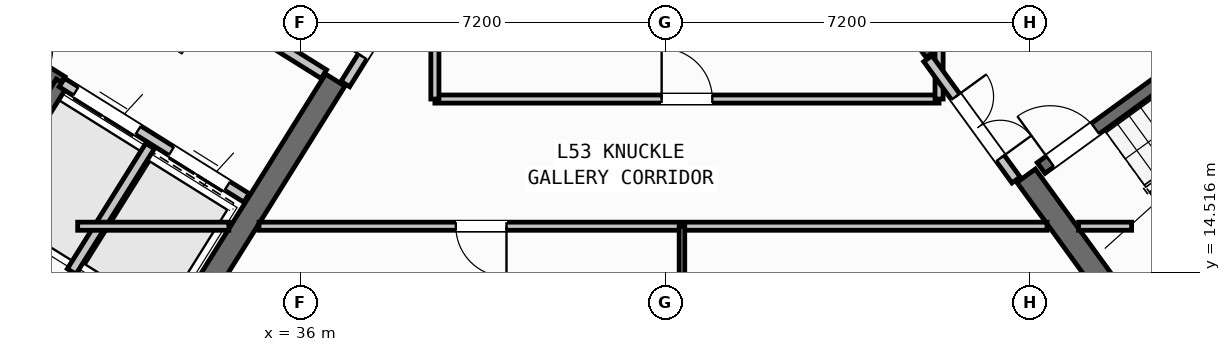
"""IFC4 building model, lengths in metres.
Left out: names, types, materials, properties, quantities, classifications, styles, units other than length and angle.
Written with IfcOpenShell. Run it as: python <this file> out.ifc"""

import sys

from ifc_helpers import new_model, si_unit, direction, frame, frame_2d, origin, place, context, subcontext, project, spatial, rectangle, extrude, source, transform, mapped, element, fill, save


model = new_model("IFC4")
c1 = context("Model", 3, precision=1e-05, world=origin(), true_north=direction((0.0, 1.0)))
c2 = subcontext(c1, "Body", "Model", "MODEL_VIEW")
j1 = project(units=[si_unit("LENGTHUNIT", "METRE"), si_unit("PLANEANGLEUNIT", "RADIAN")], contexts=[c1])
p1 = place(None, origin())
s1 = spatial("IfcSite", under=j1, at=p1, CompositionType="ELEMENT")
p2 = place(p1, origin())
s2 = spatial("IfcBuilding", under=s1, at=p2, CompositionType="ELEMENT")
p3 = place(p2, frame((0.0, 0.0, 211.2)))
s3 = spatial("IfcBuildingStorey", under=s2, at=p3, CompositionType="ELEMENT", Elevation=211.2)
p4 = place(p3, frame((33.324, 12.503, 0.0), z_axis=(0.0, 0.0, 1.0), x_axis=(-0.848043529849, 0.529926571782, 0.0)))
e1 = element("IfcWall", 1, at=p4, inside=s3, PredefinedType="SHEAR", context=c2, shape_type="SweptSolid", body=[
    extrude(rectangle(XDim=13.04, YDim=0.45, at=frame_2d((6.52, 0.0))), origin(), (0.0, 0.0, 1.0), 3.35),
])
p5 = place(p3, frame((36.683, 18.304, 0.0), z_axis=(0.0, 0.0, 1.0), x_axis=(-0.529904039071, -0.848057609704, 0.0)))
e2 = element("IfcWall", 2, at=p5, inside=s3, PredefinedType="SHEAR", context=c2, shape_type="SweptSolid", body=[
    extrude(rectangle(XDim=6.475, YDim=0.45, at=frame_2d((3.238, 0.0))), origin(), (0.0, 0.0, 1.0), 3.35),
])
p6 = place(p3, frame((52.399, 13.169, 0.0), z_axis=(0.0, 0.0, 1.0), x_axis=(0.809022352778, 0.587777877013, 0.0)))
e3 = element("IfcWall", 3, at=p6, inside=s3, PredefinedType="SHEAR", context=c2, shape_type="SweptSolid", body=[
    extrude(rectangle(XDim=12.24, YDim=0.45, at=frame_2d((6.12, 0.0))), origin(), (0.0, 0.0, 1.0), 3.35),
])
p7 = place(p3, frame((52.449, 13.483, 0.0), z_axis=(0.0, 0.0, 1.0), x_axis=(-0.587819244441, 0.808992296542, 0.0)))
e4 = element("IfcWall", 4, at=p7, inside=s3, PredefinedType="SHEAR", context=c2, shape_type="SweptSolid", body=[
    extrude(rectangle(XDim=3.625, YDim=0.45, at=frame_2d((1.812, 0.0))), origin(), (0.0, 0.0, 1.0), 3.35),
])
p8 = place(p3, frame((48.526, 18.884, 0.0), z_axis=(0.0, 0.0, 1.0), x_axis=(-0.587774812919, 0.809024578921, 0.0)))
e5 = element("IfcWall", 5, at=p8, inside=s3, PredefinedType="SHEAR", context=c2, shape_type="SweptSolid", body=[
    extrude(rectangle(XDim=6.475, YDim=0.45, at=frame_2d((3.238, 0.0))), origin(), (0.0, 0.0, 1.0), 3.35),
])
p9 = place(p3, frame((31.76, 12.183, 0.0), z_axis=(0.0, 0.0, 1.0), x_axis=(-0.848047074256, 0.529920899612, 0.0)))
e6 = element("IfcWall", 6, at=p9, inside=s3, PredefinedType="STANDARD", context=c2, shape_type="SweptSolid", body=[
    extrude(rectangle(XDim=30.652, YDim=0.32, at=frame_2d((15.326, 0.0))), origin(), (0.0, 0.0, 1.0), 3.35),
])
p10 = place(p9, frame((15.166, 0.0, 0.0)))
e7 = element("IfcOpeningElement", 7, at=p10, cuts=e6, PredefinedType="OPENING", context=c2, shape_type="SweptSolid", body=[
    extrude(rectangle(XDim=1.2, YDim=2.15, at=frame_2d((0.6, 1.075))), frame((0.0, 0.17, 0.0), z_axis=(0.0, -1.0, 0.0), x_axis=(1.0, 0.0, 0.0)), (0.0, 0.0, 1.0), 0.34),
])
p11 = place(p9, frame((2.24, 0.0, 0.9)))
e8 = element("IfcOpeningElement", 8, at=p11, cuts=e6, PredefinedType="OPENING", context=c2, shape_type="SweptSolid", body=[
    extrude(rectangle(XDim=1.65, YDim=1.45, at=frame_2d((0.825, 0.725))), frame((0.0, 0.17, 0.0), z_axis=(0.0, -1.0, 0.0), x_axis=(1.0, 0.0, 0.0)), (0.0, 0.0, 1.0), 0.34),
])
p12 = place(p9, frame((7.469, 0.0, 0.9)))
e9 = element("IfcOpeningElement", 9, at=p12, cuts=e6, PredefinedType="OPENING", context=c2, shape_type="SweptSolid", body=[
    extrude(rectangle(XDim=1.65, YDim=1.45, at=frame_2d((0.825, 0.725))), frame((0.0, 0.17, 0.0), z_axis=(0.0, -1.0, 0.0), x_axis=(1.0, 0.0, 0.0)), (0.0, 0.0, 1.0), 0.34),
])
p13 = place(p9, frame((12.623, 0.0, 1.0)))
e10 = element("IfcOpeningElement", 10, at=p13, cuts=e6, PredefinedType="OPENING", context=c2, shape_type="SweptSolid", body=[
    extrude(rectangle(XDim=0.9, YDim=1.25, at=frame_2d((0.45, 0.625))), frame((0.0, 0.17, 0.0), z_axis=(0.0, -1.0, 0.0), x_axis=(1.0, 0.0, 0.0)), (0.0, 0.0, 1.0), 0.34),
])
p14 = place(p9, frame((19.715, 0.0, 1.0)))
e11 = element("IfcOpeningElement", 11, at=p14, cuts=e6, PredefinedType="OPENING", context=c2, shape_type="SweptSolid", body=[
    extrude(rectangle(XDim=0.9, YDim=1.25, at=frame_2d((0.45, 0.625))), frame((0.0, 0.17, 0.0), z_axis=(0.0, -1.0, 0.0), x_axis=(1.0, 0.0, 0.0)), (0.0, 0.0, 1.0), 0.34),
])
p15 = place(p9, frame((25.566, 0.0, 0.9)))
e12 = element("IfcOpeningElement", 12, at=p15, cuts=e6, PredefinedType="OPENING", context=c2, shape_type="SweptSolid", body=[
    extrude(rectangle(XDim=1.65, YDim=1.45, at=frame_2d((0.825, 0.725))), frame((0.0, 0.17, 0.0), z_axis=(0.0, -1.0, 0.0), x_axis=(1.0, 0.0, 0.0)), (0.0, 0.0, 1.0), 0.34),
])
p16 = place(p9, frame((28.896, 0.0, 1.0)))
e13 = element("IfcOpeningElement", 13, at=p16, cuts=e6, PredefinedType="OPENING", context=c2, shape_type="SweptSolid", body=[
    extrude(rectangle(XDim=0.9, YDim=1.25, at=frame_2d((0.45, 0.625))), frame((0.0, 0.17, 0.0), z_axis=(0.0, -1.0, 0.0), x_axis=(1.0, 0.0, 0.0)), (0.0, 0.0, 1.0), 0.34),
])
p17 = place(p3, frame((31.28, 18.261, 0.0), z_axis=(0.0, 0.0, 1.0), x_axis=(-0.848051618787, 0.529913626805, 0.0)))
e14 = element("IfcWall", 14, at=p17, inside=s3, PredefinedType="SHEAR", context=c2, shape_type="SweptSolid", body=[
    extrude(rectangle(XDim=7.46, YDim=0.26, at=frame_2d((3.73, 0.0))), origin(), (0.0, 0.0, 1.0), 3.35),
])
p18 = place(p17, frame((0.36, 0.0, 0.0)))
e15 = element("IfcOpeningElement", 15, at=p18, cuts=e14, PredefinedType="OPENING", context=c2, shape_type="SweptSolid", body=[
    extrude(rectangle(XDim=0.86, YDim=2.05, at=frame_2d((0.43, 1.025))), frame((0.0, 0.14, 0.0), z_axis=(0.0, -1.0, 0.0), x_axis=(1.0, 0.0, 0.0)), (0.0, 0.0, 1.0), 0.28),
])
p19 = place(p3, frame((31.288, 18.256, 0.0), z_axis=(0.0, 0.0, 1.0), x_axis=(-0.529943379326, -0.848033026897, 0.0)))
e16 = element("IfcWall", 16, at=p19, inside=s3, PredefinedType="SHEAR", context=c2, shape_type="SweptSolid", body=[
    extrude(rectangle(XDim=3.16, YDim=0.26, at=frame_2d((1.58, 0.0))), origin(), (0.0, 0.0, 1.0), 3.35),
])
p20 = place(p3, frame((34.933, 15.978, 0.0), z_axis=(0.0, 0.0, 1.0), x_axis=(-0.848055739377, 0.529907032327, 0.0)))
e17 = element("IfcWall", 17, at=p20, inside=s3, PredefinedType="STANDARD", context=c2, shape_type="SweptSolid", body=[
    extrude(rectangle(XDim=4.298, YDim=0.2, at=frame_2d((2.149, 0.0))), origin(), (0.0, 0.0, 1.0), 3.34),
])
p21 = place(p20, frame((0.448, 0.0, 0.0)))
e18 = element("IfcOpeningElement", 18, at=p21, cuts=e17, PredefinedType="OPENING", context=c2, shape_type="SweptSolid", body=[
    extrude(rectangle(XDim=1.3, YDim=2.2, at=frame_2d((0.65, 1.1))), frame((0.0, 0.11, 0.0), z_axis=(0.0, -1.0, 0.0), x_axis=(1.0, 0.0, 0.0)), (0.0, 0.0, 1.0), 0.22),
])
p22 = place(p20, frame((2.523, 0.0, 0.0)))
e19 = element("IfcOpeningElement", 19, at=p22, cuts=e17, PredefinedType="OPENING", context=c2, shape_type="SweptSolid", body=[
    extrude(rectangle(XDim=1.45, YDim=2.25, at=frame_2d((0.725, 1.125))), frame((0.0, 0.11, 0.0), z_axis=(0.0, -1.0, 0.0), x_axis=(1.0, 0.0, 0.0)), (0.0, 0.0, 1.0), 0.22),
])
p23 = place(p3, frame((36.459, 18.421, 0.0), z_axis=(0.0, 0.0, 1.0), x_axis=(-0.848059591691, 0.529900867089, 0.0)))
e20 = element("IfcWall", 20, at=p23, inside=s3, PredefinedType="STANDARD", context=c2, shape_type="SweptSolid", body=[
    extrude(rectangle(XDim=5.818, YDim=0.2, at=frame_2d((2.909, 0.0))), origin(), (0.0, 0.0, 1.0), 3.34),
])
p24 = place(p23, frame((2.598, 0.0, 0.0)))
e21 = element("IfcOpeningElement", 21, at=p24, cuts=e20, PredefinedType="OPENING", context=c2, shape_type="SweptSolid", body=[
    extrude(rectangle(XDim=1.15, YDim=2.1, at=frame_2d((0.575, 1.05))), frame((0.0, 0.11, 0.0), z_axis=(0.0, -1.0, 0.0), x_axis=(1.0, 0.0, 0.0)), (0.0, 0.0, 1.0), 0.22),
])
p25 = place(p3, frame((33.029, 17.003, 0.0), z_axis=(0.0, 0.0, 1.0), x_axis=(-0.529916267533, -0.848049968695, 0.0)))
e22 = element("IfcWall", 22, at=p25, inside=s3, PredefinedType="STANDARD", context=c2, shape_type="SweptSolid", body=[
    extrude(rectangle(XDim=2.92, YDim=0.2, at=frame_2d((1.46, 0.0))), origin(), (0.0, 0.0, 1.0), 3.34),
])
p26 = place(p3, frame((52.472, 14.013, 0.0), z_axis=(0.0, 0.0, 1.0), x_axis=(0.809028366311, 0.587769599847, 0.0)))
e23 = element("IfcWall", 23, at=p26, inside=s3, PredefinedType="SHEAR", context=c2, shape_type="SweptSolid", body=[
    extrude(rectangle(XDim=7.33, YDim=0.26, at=frame_2d((3.665, 0.0))), origin(), (0.0, 0.0, 1.0), 3.35),
])
p27 = place(p3, frame((50.615, 16.57, 0.0), z_axis=(0.0, 0.0, 1.0), x_axis=(0.809028366311, 0.587769599847, 0.0)))
e24 = element("IfcWall", 24, at=p27, inside=s3, PredefinedType="SHEAR", context=c2, shape_type="SweptSolid", body=[
    extrude(rectangle(XDim=7.33, YDim=0.26, at=frame_2d((3.665, 0.0))), origin(), (0.0, 0.0, 1.0), 3.35),
])
p28 = place(p27, frame((0.22, 0.0, 0.0)))
e25 = element("IfcOpeningElement", 25, at=p28, cuts=e24, PredefinedType="OPENING", context=c2, shape_type="SweptSolid", body=[
    extrude(rectangle(XDim=1.1, YDim=2.1, at=frame_2d((0.55, 1.05))), frame((0.0, 0.14, 0.0), z_axis=(0.0, -1.0, 0.0), x_axis=(1.0, 0.0, 0.0)), (0.0, 0.0, 1.0), 0.28),
])
p29 = place(p3, frame((38.451, 20.737, 0.0), z_axis=(0.0, 0.0, 1.0), x_axis=(-0.529924799939, -0.848044637038, 0.0)))
e26 = element("IfcWall", 26, at=p29, inside=s3, PredefinedType="STANDARD", context=c2, shape_type="SweptSolid", body=[
    extrude(rectangle(XDim=2.96, YDim=0.2, at=frame_2d((1.48, 0.0))), origin(), (0.0, 0.0, 1.0), 3.34),
])
p30 = place(p29, frame((1.46, 0.0, 0.0)))
e27 = element("IfcOpeningElement", 27, at=p30, cuts=e26, PredefinedType="OPENING", context=c2, shape_type="SweptSolid", body=[
    extrude(rectangle(XDim=0.86, YDim=2.05, at=frame_2d((0.43, 1.025))), frame((0.0, 0.11, 0.0), z_axis=(0.0, -1.0, 0.0), x_axis=(1.0, 0.0, 0.0)), (0.0, 0.0, 1.0), 0.22),
])
p31 = place(p3, frame((31.6, 15.42, 0.0), z_axis=(0.0, 0.0, 1.0), x_axis=(1.0, 0.0, 0.0)))
e28 = element("IfcWall", 28, at=p31, inside=s3, PredefinedType="PARTITIONING", context=c2, shape_type="SweptSolid", body=[
    extrude(rectangle(XDim=2.984, YDim=0.16, at=frame_2d((1.492, 0.0))), origin(), (0.0, 0.0, 1.0), 3.34),
])
p32 = place(p3, frame((35.178, 15.42, 0.0), z_axis=(0.0, 0.0, 1.0), x_axis=(1.0, 0.0, 0.0)))
e29 = element("IfcWall", 29, at=p32, inside=s3, PredefinedType="PARTITIONING", context=c2, shape_type="SweptSolid", body=[
    extrude(rectangle(XDim=15.552, YDim=0.16, at=frame_2d((7.776, 0.0))), origin(), (0.0, 0.0, 1.0), 3.34),
])
p33 = place(p32, frame((3.885, 0.0, 0.0)))
e30 = element("IfcOpeningElement", 30, at=p33, cuts=e29, PredefinedType="OPENING", context=c2, shape_type="SweptSolid", body=[
    extrude(rectangle(XDim=1.0, YDim=2.1, at=frame_2d((0.5, 1.05))), frame((0.0, 0.09, 0.0), z_axis=(0.0, -1.0, 0.0), x_axis=(1.0, 0.0, 0.0)), (0.0, 0.0, 1.0), 0.18),
])
p34 = place(p3, frame((51.354, 15.42, 0.0), z_axis=(0.0, 0.0, 1.0), x_axis=(1.0, 0.0, 0.0)))
e31 = element("IfcWall", 31, at=p34, inside=s3, PredefinedType="PARTITIONING", context=c2, shape_type="SweptSolid", body=[
    extrude(rectangle(XDim=1.046, YDim=0.16, at=frame_2d((0.523, 0.0))), origin(), (0.0, 0.0, 1.0), 3.34),
])
p35 = place(p3, frame((38.65, 17.93, 0.0), z_axis=(0.0, 0.0, 1.0), x_axis=(1.0, 0.0, 0.0)))
e32 = element("IfcWall", 32, at=p35, inside=s3, PredefinedType="PARTITIONING", context=c2, shape_type="SweptSolid", body=[
    extrude(rectangle(XDim=9.95, YDim=0.16, at=frame_2d((4.975, 0.0))), origin(), (0.0, 0.0, 1.0), 3.34),
])
p36 = place(p35, frame((4.475, 0.0, 0.0)))
e33 = element("IfcOpeningElement", 33, at=p36, cuts=e32, PredefinedType="OPENING", context=c2, shape_type="SweptSolid", body=[
    extrude(rectangle(XDim=1.0, YDim=2.1, at=frame_2d((0.5, 1.05))), frame((0.0, 0.09, 0.0), z_axis=(0.0, -1.0, 0.0), x_axis=(1.0, 0.0, 0.0)), (0.0, 0.0, 1.0), 0.18),
])
p37 = place(p3, frame((38.65, 17.93, 0.0), z_axis=(0.0, 0.0, 1.0), x_axis=(0.0, 1.0, 0.0)))
e34 = element("IfcWall", 34, at=p37, inside=s3, PredefinedType="PARTITIONING", context=c2, shape_type="SweptSolid", body=[
    extrude(rectangle(XDim=3.046, YDim=0.16, at=frame_2d((1.523, 0.0))), origin(), (0.0, 0.0, 1.0), 3.34),
])
p38 = place(p3, frame((48.6, 17.93, 0.0), z_axis=(0.0, 0.0, 1.0), x_axis=(0.0, 1.0, 0.0)))
e35 = element("IfcWall", 35, at=p38, inside=s3, PredefinedType="PARTITIONING", context=c2, shape_type="SweptSolid", body=[
    extrude(rectangle(XDim=0.993, YDim=0.16, at=frame_2d((0.496, 0.0))), origin(), (0.0, 0.0, 1.0), 3.34),
])
p39 = place(p3, frame((50.119, 16.333, 0.0), z_axis=(0.0, 0.0, 1.0), x_axis=(-0.587749856981, 0.809042709391, 0.0)))
e36 = element("IfcWall", 36, at=p39, inside=s3, PredefinedType="STANDARD", context=c2, shape_type="SweptSolid", body=[
    extrude(rectangle(XDim=2.96, YDim=0.2, at=frame_2d((1.48, 0.0))), origin(), (0.0, 0.0, 1.0), 3.34),
])
p40 = place(p39, frame((0.53, 0.0, 0.0)))
e37 = element("IfcOpeningElement", 37, at=p40, cuts=e36, PredefinedType="OPENING", context=c2, shape_type="SweptSolid", body=[
    extrude(rectangle(XDim=1.5, YDim=2.15, at=frame_2d((0.75, 1.075))), frame((0.0, 0.11, 0.0), z_axis=(0.0, -1.0, 0.0), x_axis=(1.0, 0.0, 0.0)), (0.0, 0.0, 1.0), 0.22),
])
p41 = place(p3, frame((43.526, 1.96, 0.0), z_axis=(0.0, 0.0, 1.0), x_axis=(0.0, 1.0, 0.0)))
e38 = element("IfcWall", 38, at=p41, inside=s3, PredefinedType="PARTITIONING", context=c2, shape_type="SweptSolid", body=[
    extrude(rectangle(XDim=13.46, YDim=0.11, at=frame_2d((6.73, 0.0))), origin(), (0.0, 0.0, 1.0), 3.34),
])
p42 = place(p41, frame((5.5, 0.0, 0.0)))
e39 = element("IfcOpeningElement", 39, at=p42, cuts=e38, PredefinedType="OPENING", context=c2, shape_type="SweptSolid", body=[
    extrude(rectangle(XDim=0.92, YDim=2.08, at=frame_2d((0.46, 1.04))), frame((0.0, 0.065, 0.0), z_axis=(0.0, -1.0, 0.0), x_axis=(1.0, 0.0, 0.0)), (0.0, 0.0, 1.0), 0.13),
])
p43 = place(p41, frame((10.67, 0.0, 0.0)))
e40 = element("IfcOpeningElement", 40, at=p43, cuts=e38, PredefinedType="OPENING", context=c2, shape_type="SweptSolid", body=[
    extrude(rectangle(XDim=0.88, YDim=2.08, at=frame_2d((0.44, 1.04))), frame((0.0, 0.065, 0.0), z_axis=(0.0, -1.0, 0.0), x_axis=(1.0, 0.0, 0.0)), (0.0, 0.0, 1.0), 0.13),
])
m1 = source(origin(), c2, "Body", "SweptSolid", [
    extrude(rectangle(XDim=1.3, YDim=2.2, at=frame_2d((0.65, 1.1))), frame((0.0, 0.025, 0.0), z_axis=(0.0, -1.0, 0.0), x_axis=(1.0, 0.0, 0.0)), (0.0, 0.0, 1.0), 0.05),
])
p44 = place(p21, origin())
e41 = element("IfcDoor", 41, at=p44, inside=s3, OperationType="DOUBLE_DOOR_SLIDING", PredefinedType="DOOR", context=c2, shape_type="MappedRepresentation", body=[
    mapped(m1, transform((0.0, 0.0, 0.0), scale=1.0)),
])
fill(e18, e41)
m2 = source(origin(), c2, "Body", "SweptSolid", [
    extrude(rectangle(XDim=1.45, YDim=2.25, at=frame_2d((0.725, 1.125))), frame((0.0, 0.025, 0.0), z_axis=(0.0, -1.0, 0.0), x_axis=(1.0, 0.0, 0.0)), (0.0, 0.0, 1.0), 0.05),
])
p45 = place(p22, origin())
e42 = element("IfcDoor", 42, at=p45, inside=s3, OperationType="DOUBLE_DOOR_SLIDING", PredefinedType="DOOR", context=c2, shape_type="MappedRepresentation", body=[
    mapped(m2, transform((0.0, 0.0, 0.0), scale=1.0)),
])
fill(e19, e42)
m3 = source(origin(), c2, "Body", "SweptSolid", [
    extrude(rectangle(XDim=1.1, YDim=2.1, at=frame_2d((0.55, 1.05))), frame((0.0, 0.025, 0.0), z_axis=(0.0, -1.0, 0.0), x_axis=(1.0, 0.0, 0.0)), (0.0, 0.0, 1.0), 0.05),
])
p46 = place(p28, origin())
e43 = element("IfcDoor", 43, at=p46, inside=s3, OperationType="SINGLE_SWING_LEFT", PredefinedType="DOOR", context=c2, shape_type="MappedRepresentation", body=[
    mapped(m3, transform((0.0, 0.0, 0.0), scale=1.0)),
])
fill(e25, e43)
m4 = source(origin(), c2, "Body", "SweptSolid", [
    extrude(rectangle(XDim=1.0, YDim=2.1, at=frame_2d((0.5, 1.05))), frame((0.0, 0.025, 0.0), z_axis=(0.0, -1.0, 0.0), x_axis=(1.0, 0.0, 0.0)), (0.0, 0.0, 1.0), 0.05),
])
p47 = place(p36, origin())
e44 = element("IfcDoor", 44, at=p47, inside=s3, OperationType="SINGLE_SWING_LEFT", PredefinedType="DOOR", context=c2, shape_type="MappedRepresentation", body=[
    mapped(m4, transform((0.0, 0.0, 0.0), scale=1.0)),
])
fill(e33, e44)
m5 = source(origin(), c2, "Body", "SweptSolid", [
    extrude(rectangle(XDim=0.86, YDim=2.05, at=frame_2d((0.43, 1.025))), frame((0.0, 0.025, 0.0), z_axis=(0.0, -1.0, 0.0), x_axis=(1.0, 0.0, 0.0)), (0.0, 0.0, 1.0), 0.05),
])
p48 = place(p30, frame((0.86, 0.0, 0.0), z_axis=(0.0, 0.0, 1.0), x_axis=(-1.0, 0.0, 0.0)))
e45 = element("IfcDoor", 45, at=p48, inside=s3, OperationType="SINGLE_SWING_LEFT", PredefinedType="DOOR", context=c2, shape_type="MappedRepresentation", body=[
    mapped(m5, transform((0.0, 0.0, 0.0), scale=1.0)),
])
fill(e27, e45)
m6 = source(origin(), c2, "Body", "SweptSolid", [
    extrude(rectangle(XDim=1.5, YDim=2.15, at=frame_2d((0.75, 1.075))), frame((0.0, 0.025, 0.0), z_axis=(0.0, -1.0, 0.0), x_axis=(1.0, 0.0, 0.0)), (0.0, 0.0, 1.0), 0.05),
])
p49 = place(p40, frame((1.5, 0.0, 0.0), z_axis=(0.0, 0.0, 1.0), x_axis=(-1.0, 0.0, 0.0)))
e46 = element("IfcDoor", 46, at=p49, inside=s3, OperationType="DOUBLE_DOOR_SINGLE_SWING", PredefinedType="DOOR", context=c2, shape_type="MappedRepresentation", body=[
    mapped(m6, transform((0.0, 0.0, 0.0), scale=1.0)),
])
fill(e37, e46)
p50 = place(p33, frame((1.0, 0.0, 0.0), z_axis=(0.0, 0.0, 1.0), x_axis=(-1.0, 0.0, 0.0)))
e47 = element("IfcDoor", 47, at=p50, inside=s3, OperationType="SINGLE_SWING_LEFT", PredefinedType="DOOR", context=c2, shape_type="MappedRepresentation", body=[
    mapped(m4, transform((0.0, 0.0, 0.0), scale=1.0)),
])
fill(e30, e47)
save(model, sys.argv[1])
